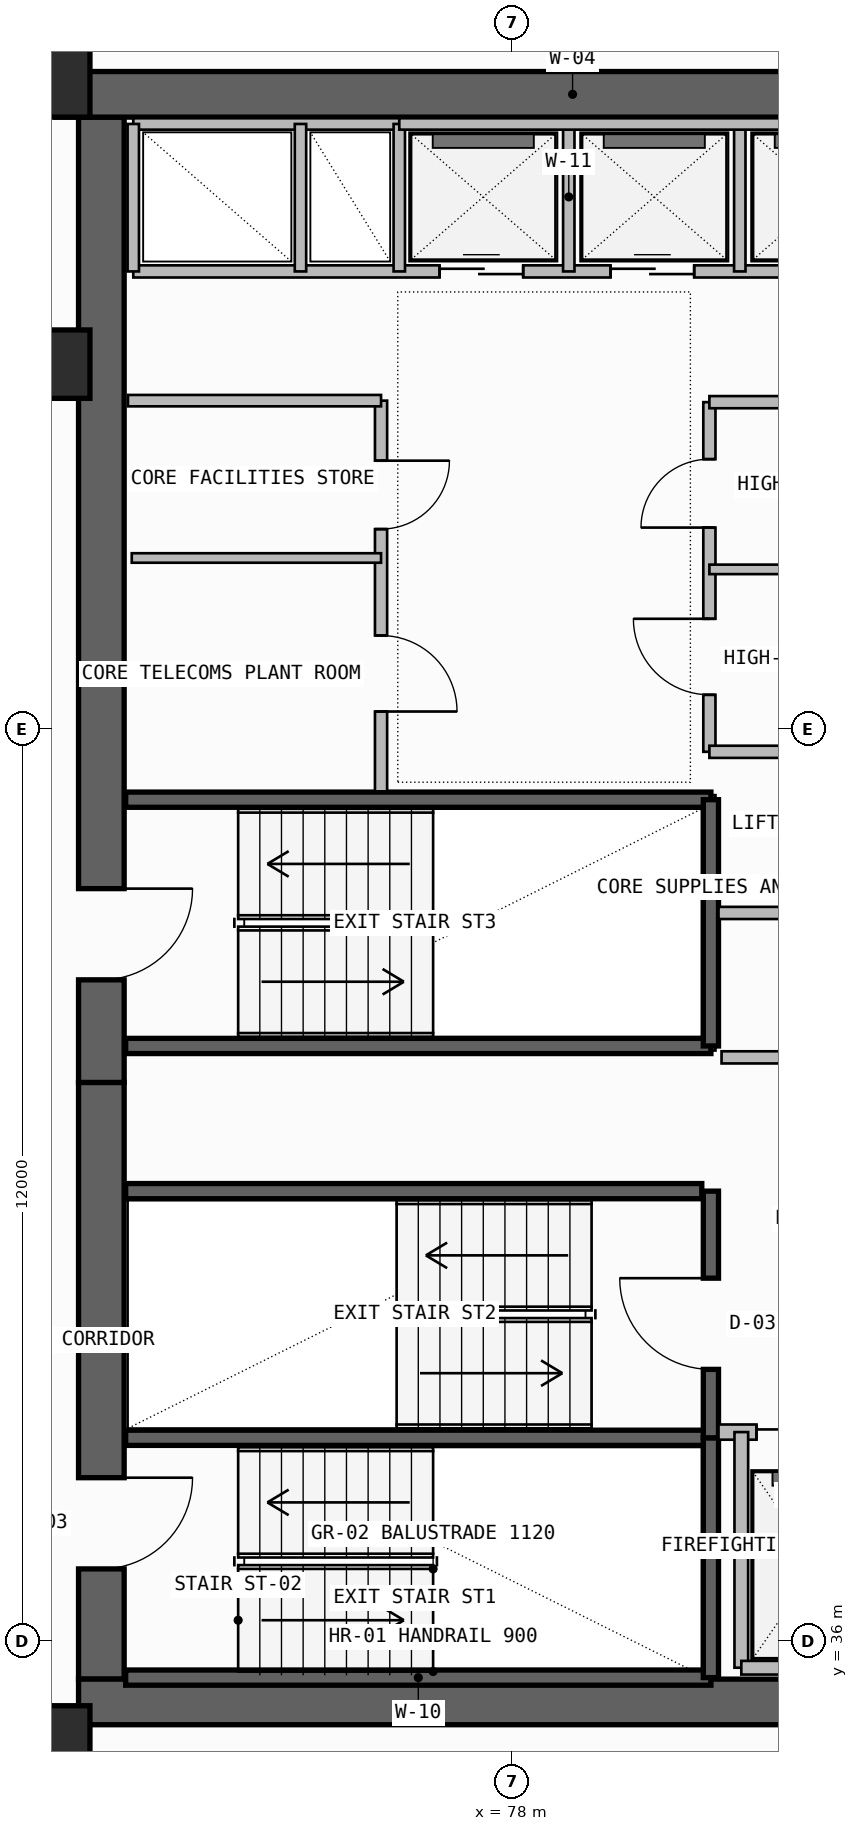
"""IFC4 building model, lengths in metres.
Left out: names, types, materials, properties, quantities, classifications, styles, units other than length and angle.
Written with IfcOpenShell. Run it as: python <this file> out.ifc"""

import sys

from ifc_helpers import new_model, si_unit, direction, frame, frame_2d, origin, origin_2d, place, context, subcontext, project, spatial, rectangle, extrude, element, fill, save


model = new_model("IFC4")
c1 = context("Model", 3, precision=1e-05, world=origin(), true_north=direction((0.0, 1.0)))
c2 = subcontext(c1, "Body", "Model", "MODEL_VIEW")
j1 = project(units=[si_unit("LENGTHUNIT", "METRE"), si_unit("PLANEANGLEUNIT", "RADIAN")], contexts=[c1])
p1 = place(None, origin())
s1 = spatial("IfcSite", under=j1, at=p1, CompositionType="ELEMENT")
p2 = place(p1, origin())
s2 = spatial("IfcBuilding", under=s1, at=p2, CompositionType="ELEMENT")
p3 = place(p2, frame((0.0, 0.0, 243.14)))
s3 = spatial("IfcBuildingStorey", under=s2, at=p3, CompositionType="ELEMENT", Elevation=243.14)
p4 = place(p3, frame((72.6, 35.5, -0.26), z_axis=(0.0, 0.0, 1.0), x_axis=(0.0, 1.0, 0.0)))
e1 = element("IfcWall", 1, at=p4, inside=s3, PredefinedType="SHEAR", context=c2, shape_type="SweptSolid", body=[
    extrude(rectangle(XDim=7.85, YDim=0.6, at=frame_2d((3.925, 0.0))), origin(), (0.0, 0.0, 1.0), 3.52),
])
p5 = place(p4, frame((1.45, 0.0, 0.26)))
e2 = element("IfcOpeningElement", 2, at=p5, cuts=e1, PredefinedType="OPENING", context=c2, shape_type="SweptSolid", body=[
    extrude(rectangle(XDim=1.2, YDim=2.2, at=frame_2d((0.6, 1.1))), frame((0.0, 0.31, 0.0), z_axis=(0.0, -1.0, 0.0), x_axis=(1.0, 0.0, 0.0)), (0.0, 0.0, 1.0), 0.62),
])
p6 = place(p3, frame((72.3, 35.2, -0.26), z_axis=(0.0, 0.0, 1.0), x_axis=(1.0, 0.0, 0.0)))
e3 = element("IfcWall", 3, at=p6, inside=s3, PredefinedType="SHEAR", context=c2, shape_type="SweptSolid", body=[
    extrude(rectangle(XDim=13.3, YDim=0.6, at=frame_2d((6.65, 0.0))), origin(), (0.0, 0.0, 1.0), 3.52),
])
p7 = place(p3, frame((72.6, 43.35, -0.26), z_axis=(0.0, 0.0, 1.0), x_axis=(0.0, 1.0, 0.0)))
e4 = element("IfcWall", 4, at=p7, inside=s3, PredefinedType="SHEAR", context=c2, shape_type="SweptSolid", body=[
    extrude(rectangle(XDim=12.7, YDim=0.6, at=frame_2d((6.35, 0.0))), origin(), (0.0, 0.0, 1.0), 3.52),
])
p8 = place(p7, frame((1.35, 0.0, 0.26)))
e5 = element("IfcOpeningElement", 5, at=p8, cuts=e4, PredefinedType="OPENING", context=c2, shape_type="SweptSolid", body=[
    extrude(rectangle(XDim=1.2, YDim=2.2, at=frame_2d((0.6, 1.1))), frame((0.0, 0.31, 0.0), z_axis=(0.0, -1.0, 0.0), x_axis=(1.0, 0.0, 0.0)), (0.0, 0.0, 1.0), 0.62),
])
p9 = place(p3, frame((72.0, 56.35, -0.26), z_axis=(0.0, 0.0, 1.0), x_axis=(1.0, 0.0, 0.0)))
e6 = element("IfcWall", 6, at=p9, inside=s3, PredefinedType="SHEAR", context=c2, shape_type="SweptSolid", body=[
    extrude(rectangle(XDim=13.6, YDim=0.6, at=frame_2d((6.8, 0.0))), origin(), (0.0, 0.0, 1.0), 3.52),
])
for number, where, z_axis, x_axis in (
    (7, (72.0, 34.7, 0.0), (0.0, 0.0, 1.0), (1.0, 0.0, 0.0)),
    (8, (72.0, 52.8, 0.0), (0.0, 0.0, 1.0), (1.0, 0.0, 0.0)),
    (9, (72.0, 56.5, 0.0), (0.0, 0.0, 1.0), (1.0, 0.0, 0.0)),
):
    element("IfcColumn", number, at=place(p3, frame(where, z_axis=z_axis, x_axis=x_axis)), inside=s3, PredefinedType="COLUMN", context=c2, shape_type="SweptSolid", body=[
        extrude(rectangle(XDim=0.9, YDim=0.9, at=origin_2d()), origin(), (0.0, 0.0, 1.0), 3.52),
    ])
for number, where, z_axis, x_axis in (
    (10, (72.92, 35.52, -0.26), (0.0, 0.0, 1.0), (1.0, 0.0, 0.0)),
    (11, (72.92, 38.675, -0.26), (0.0, 0.0, 1.0), (1.0, 0.0, 0.0)),
):
    element("IfcWall", number, at=place(p3, frame(where, z_axis=z_axis, x_axis=x_axis)), inside=s3, PredefinedType="SOLIDWALL", context=c2, shape_type="SweptSolid", body=[
        extrude(rectangle(XDim=7.7, YDim=0.2, at=frame_2d((3.85, 0.0))), origin(), (0.0, 0.0, 1.0), 3.52),
    ])
p10 = place(p3, frame((80.62, 35.52, -0.26), z_axis=(0.0, 0.0, 1.0), x_axis=(0.0, 1.0, 0.0)))
e12 = element("IfcWall", 12, at=p10, inside=s3, PredefinedType="SOLIDWALL", context=c2, shape_type="SweptSolid", body=[
    extrude(rectangle(XDim=3.155, YDim=0.2, at=frame_2d((1.578, 0.0))), origin(), (0.0, 0.0, 1.0), 3.52),
])
p11 = place(p3, frame((80.62, 38.675, -0.26), z_axis=(0.0, 0.0, 1.0), x_axis=(0.0, 1.0, 0.0)))
e13 = element("IfcWall", 13, at=p11, inside=s3, PredefinedType="SOLIDWALL", context=c2, shape_type="SweptSolid", body=[
    extrude(rectangle(XDim=3.245, YDim=0.2, at=frame_2d((1.623, 0.0))), origin(), (0.0, 0.0, 1.0), 3.52),
])
p12 = place(p11, frame((0.9, 0.0, 0.26)))
e14 = element("IfcOpeningElement", 14, at=p12, cuts=e13, PredefinedType="OPENING", context=c2, shape_type="SweptSolid", body=[
    extrude(rectangle(XDim=1.2, YDim=2.2, at=frame_2d((0.6, 1.1))), frame((0.0, 0.11, 0.0), z_axis=(0.0, -1.0, 0.0), x_axis=(1.0, 0.0, 0.0)), (0.0, 0.0, 1.0), 0.22),
])
p13 = place(p3, frame((80.72, 38.75, 0.0), z_axis=(0.0, 0.0, 1.0), x_axis=(1.0, 0.0, 0.0)))
e15 = element("IfcWall", 15, at=p13, inside=s3, PredefinedType="SOLIDWALL", context=c2, shape_type="SweptSolid", body=[
    extrude(rectangle(XDim=4.26, YDim=0.2, at=frame_2d((2.13, 0.0))), origin(), (0.0, 0.0, 1.0), 3.26),
])
p14 = place(p13, frame((0.5, 0.0, 0.0)))
e16 = element("IfcOpeningElement", 16, at=p14, cuts=e15, PredefinedType="OPENING", context=c2, shape_type="SweptSolid", body=[
    extrude(rectangle(XDim=1.3, YDim=2.3, at=frame_2d((0.65, 1.15))), frame((0.0, 0.11, 0.0), z_axis=(0.0, -1.0, 0.0), x_axis=(1.0, 0.0, 0.0)), (0.0, 0.0, 1.0), 0.22),
])
p15 = place(p13, frame((2.45, 0.0, 0.0)))
e17 = element("IfcOpeningElement", 17, at=p15, cuts=e15, PredefinedType="OPENING", context=c2, shape_type="SweptSolid", body=[
    extrude(rectangle(XDim=1.3, YDim=2.3, at=frame_2d((0.65, 1.15))), frame((0.0, 0.11, 0.0), z_axis=(0.0, -1.0, 0.0), x_axis=(1.0, 0.0, 0.0)), (0.0, 0.0, 1.0), 0.22),
])
p16 = place(p3, frame((81.02, 35.65, 0.0), z_axis=(0.0, 0.0, 1.0), x_axis=(0.0, 1.0, 0.0)))
e18 = element("IfcWall", 18, at=p16, inside=s3, PredefinedType="SOLIDWALL", context=c2, shape_type="SweptSolid", body=[
    extrude(rectangle(XDim=3.1, YDim=0.18, at=frame_2d((1.55, 0.0))), origin(), (0.0, 0.0, 1.0), 3.26),
])
p17 = place(p3, frame((81.02, 35.65, 0.0), z_axis=(0.0, 0.0, 1.0), x_axis=(1.0, 0.0, 0.0)))
e19 = element("IfcWall", 19, at=p17, inside=s3, PredefinedType="SOLIDWALL", context=c2, shape_type="SweptSolid", body=[
    extrude(rectangle(XDim=3.93, YDim=0.18, at=frame_2d((1.965, 0.0))), origin(), (0.0, 0.0, 1.0), 3.26),
])
p18 = place(p3, frame((72.92, 41.92, -0.26), z_axis=(0.0, 0.0, 1.0), x_axis=(1.0, 0.0, 0.0)))
e20 = element("IfcWall", 20, at=p18, inside=s3, PredefinedType="SOLIDWALL", context=c2, shape_type="SweptSolid", body=[
    extrude(rectangle(XDim=7.58, YDim=0.2, at=frame_2d((3.79, 0.0))), origin(), (0.0, 0.0, 1.0), 3.52),
])
for number, where, z_axis, x_axis in (
    (21, (72.92, 43.83, -0.26), (0.0, 0.0, 1.0), (1.0, 0.0, 0.0)),
    (22, (72.92, 47.07, -0.26), (0.0, 0.0, 1.0), (1.0, 0.0, 0.0)),
):
    element("IfcWall", number, at=place(p3, frame(where, z_axis=z_axis, x_axis=x_axis)), inside=s3, PredefinedType="SOLIDWALL", context=c2, shape_type="SweptSolid", body=[
        extrude(rectangle(XDim=7.7, YDim=0.2, at=frame_2d((3.85, 0.0))), origin(), (0.0, 0.0, 1.0), 3.52),
    ])
p19 = place(p3, frame((80.62, 43.83, -0.26), z_axis=(0.0, 0.0, 1.0), x_axis=(0.0, 1.0, 0.0)))
e23 = element("IfcWall", 23, at=p19, inside=s3, PredefinedType="SOLIDWALL", context=c2, shape_type="SweptSolid", body=[
    extrude(rectangle(XDim=3.24, YDim=0.2, at=frame_2d((1.62, 0.0))), origin(), (0.0, 0.0, 1.0), 3.52),
])
p20 = place(p3, frame((80.72, 45.58, 0.0), z_axis=(0.0, 0.0, 1.0), x_axis=(1.0, 0.0, 0.0)))
e24 = element("IfcWall", 24, at=p20, inside=s3, PredefinedType="PLUMBINGWALL", context=c2, shape_type="SweptSolid", body=[
    extrude(rectangle(XDim=4.23, YDim=0.16, at=frame_2d((2.115, 0.0))), origin(), (0.0, 0.0, 1.0), 3.26),
])
p21 = place(p20, frame((1.65, 0.0, 0.0)))
e25 = element("IfcOpeningElement", 25, at=p21, cuts=e24, PredefinedType="OPENING", context=c2, shape_type="SweptSolid", body=[
    extrude(rectangle(XDim=0.9, YDim=2.1, at=frame_2d((0.45, 1.05))), frame((0.0, 0.09, 0.0), z_axis=(0.0, -1.0, 0.0), x_axis=(1.0, 0.0, 0.0)), (0.0, 0.0, 1.0), 0.18),
])
p22 = place(p3, frame((80.76, 43.68, 0.0), z_axis=(0.0, 0.0, 1.0), x_axis=(1.0, 0.0, 0.0)))
e26 = element("IfcWall", 26, at=p22, inside=s3, PredefinedType="PLUMBINGWALL", context=c2, shape_type="SweptSolid", body=[
    extrude(rectangle(XDim=4.19, YDim=0.16, at=frame_2d((2.095, 0.0))), origin(), (0.0, 0.0, 1.0), 3.26),
])
p23 = place(p3, frame((76.28, 47.18, 0.0), z_axis=(0.0, 0.0, 1.0), x_axis=(0.0, 1.0, 0.0)))
e27 = element("IfcWall", 27, at=p23, inside=s3, PredefinedType="SOLIDWALL", context=c2, shape_type="SweptSolid", body=[
    extrude(rectangle(XDim=5.14, YDim=0.16, at=frame_2d((2.57, 0.0))), origin(), (0.0, 0.0, 1.0), 3.26),
])
p24 = place(p23, frame((1.05, 0.0, 0.0)))
e28 = element("IfcOpeningElement", 28, at=p24, cuts=e27, PredefinedType="OPENING", context=c2, shape_type="SweptSolid", body=[
    extrude(rectangle(XDim=1.0, YDim=2.2, at=frame_2d((0.5, 1.1))), frame((0.0, 0.09, 0.0), z_axis=(0.0, -1.0, 0.0), x_axis=(1.0, 0.0, 0.0)), (0.0, 0.0, 1.0), 0.18),
])
p25 = place(p23, frame((3.45, 0.0, 0.0)))
e29 = element("IfcOpeningElement", 29, at=p25, cuts=e27, PredefinedType="OPENING", context=c2, shape_type="SweptSolid", body=[
    extrude(rectangle(XDim=0.9, YDim=2.1, at=frame_2d((0.45, 1.05))), frame((0.0, 0.09, 0.0), z_axis=(0.0, -1.0, 0.0), x_axis=(1.0, 0.0, 0.0)), (0.0, 0.0, 1.0), 0.18),
])
p26 = place(p3, frame((72.95, 52.32, 0.0), z_axis=(0.0, 0.0, 1.0), x_axis=(1.0, 0.0, 0.0)))
e30 = element("IfcWall", 30, at=p26, inside=s3, PredefinedType="SOLIDWALL", context=c2, shape_type="SweptSolid", body=[
    extrude(rectangle(XDim=3.33, YDim=0.15, at=frame_2d((1.665, 0.0))), origin(), (0.0, 0.0, 1.0), 3.26),
])
p27 = place(p3, frame((73.0, 50.25, 0.0), z_axis=(0.0, 0.0, 1.0), x_axis=(1.0, 0.0, 0.0)))
e31 = element("IfcWall", 31, at=p27, inside=s3, PredefinedType="PARTITIONING", context=c2, shape_type="SweptSolid", body=[
    extrude(rectangle(XDim=3.28, YDim=0.125, at=frame_2d((1.64, 0.0))), origin(), (0.0, 0.0, 1.0), 3.26),
])
p28 = place(p3, frame((80.6, 47.7, 0.0), z_axis=(0.0, 0.0, 1.0), x_axis=(0.0, 1.0, 0.0)))
e32 = element("IfcWall", 32, at=p28, inside=s3, PredefinedType="SOLIDWALL", context=c2, shape_type="SweptSolid", body=[
    extrude(rectangle(XDim=4.6, YDim=0.16, at=frame_2d((2.3, 0.0))), origin(), (0.0, 0.0, 1.0), 3.26),
])
p29 = place(p28, frame((0.75, 0.0, 0.0)))
e33 = element("IfcOpeningElement", 33, at=p29, cuts=e32, PredefinedType="OPENING", context=c2, shape_type="SweptSolid", body=[
    extrude(rectangle(XDim=1.0, YDim=2.2, at=frame_2d((0.5, 1.1))), frame((0.0, 0.09, 0.0), z_axis=(0.0, -1.0, 0.0), x_axis=(1.0, 0.0, 0.0)), (0.0, 0.0, 1.0), 0.18),
])
p30 = place(p28, frame((2.95, 0.0, 0.0)))
e34 = element("IfcOpeningElement", 34, at=p30, cuts=e32, PredefinedType="OPENING", context=c2, shape_type="SweptSolid", body=[
    extrude(rectangle(XDim=0.9, YDim=2.1, at=frame_2d((0.45, 1.05))), frame((0.0, 0.09, 0.0), z_axis=(0.0, -1.0, 0.0), x_axis=(1.0, 0.0, 0.0)), (0.0, 0.0, 1.0), 0.18),
])
p31 = place(p3, frame((80.6, 47.7, 0.0), z_axis=(0.0, 0.0, 1.0), x_axis=(1.0, 0.0, 0.0)))
e35 = element("IfcWall", 35, at=p31, inside=s3, PredefinedType="SOLIDWALL", context=c2, shape_type="SweptSolid", body=[
    extrude(rectangle(XDim=4.4, YDim=0.16, at=frame_2d((2.2, 0.0))), origin(), (0.0, 0.0, 1.0), 3.26),
])
p32 = place(p3, frame((80.6, 52.3, 0.0), z_axis=(0.0, 0.0, 1.0), x_axis=(1.0, 0.0, 0.0)))
e36 = element("IfcWall", 36, at=p32, inside=s3, PredefinedType="SOLIDWALL", context=c2, shape_type="SweptSolid", body=[
    extrude(rectangle(XDim=4.22, YDim=0.16, at=frame_2d((2.11, 0.0))), origin(), (0.0, 0.0, 1.0), 3.26),
])
p33 = place(p3, frame((80.6, 50.1, 0.0), z_axis=(0.0, 0.0, 1.0), x_axis=(1.0, 0.0, 0.0)))
e37 = element("IfcWall", 37, at=p33, inside=s3, PredefinedType="PARTITIONING", context=c2, shape_type="SweptSolid", body=[
    extrude(rectangle(XDim=4.22, YDim=0.125, at=frame_2d((2.11, 0.0))), origin(), (0.0, 0.0, 1.0), 3.26),
])
p34 = place(p3, frame((73.02, 54.02, 0.0), z_axis=(0.0, 0.0, 1.0), x_axis=(1.0, 0.0, 0.0)))
e38 = element("IfcWall", 38, at=p34, inside=s3, PredefinedType="SOLIDWALL", context=c2, shape_type="SweptSolid", body=[
    extrude(rectangle(XDim=12.08, YDim=0.16, at=frame_2d((6.04, 0.0))), origin(), (0.0, 0.0, 1.0), 3.26),
])
p35 = place(p34, frame((4.03, 0.0, 0.0)))
e39 = element("IfcOpeningElement", 39, at=p35, cuts=e38, PredefinedType="OPENING", context=c2, shape_type="SweptSolid", body=[
    extrude(rectangle(XDim=1.1, YDim=2.25, at=frame_2d((0.55, 1.125))), frame((0.0, 0.09, 0.0), z_axis=(0.0, -1.0, 0.0), x_axis=(1.0, 0.0, 0.0)), (0.0, 0.0, 1.0), 0.18),
])
p36 = place(p34, frame((6.28, 0.0, 0.0)))
e40 = element("IfcOpeningElement", 40, at=p36, cuts=e38, PredefinedType="OPENING", context=c2, shape_type="SweptSolid", body=[
    extrude(rectangle(XDim=1.1, YDim=2.25, at=frame_2d((0.55, 1.125))), frame((0.0, 0.09, 0.0), z_axis=(0.0, -1.0, 0.0), x_axis=(1.0, 0.0, 0.0)), (0.0, 0.0, 1.0), 0.18),
])
p37 = place(p34, frame((8.53, 0.0, 0.0)))
e41 = element("IfcOpeningElement", 41, at=p37, cuts=e38, PredefinedType="OPENING", context=c2, shape_type="SweptSolid", body=[
    extrude(rectangle(XDim=1.1, YDim=2.25, at=frame_2d((0.55, 1.125))), frame((0.0, 0.09, 0.0), z_axis=(0.0, -1.0, 0.0), x_axis=(1.0, 0.0, 0.0)), (0.0, 0.0, 1.0), 0.18),
])
p38 = place(p3, frame((73.02, 55.96, 0.0), z_axis=(0.0, 0.0, 1.0), x_axis=(1.0, 0.0, 0.0)))
e42 = element("IfcWall", 42, at=p38, inside=s3, PredefinedType="SOLIDWALL", context=c2, shape_type="SweptSolid", body=[
    extrude(rectangle(XDim=3.5, YDim=0.15, at=frame_2d((1.75, 0.0))), origin(), (0.0, 0.0, 1.0), 3.26),
])
p39 = place(p3, frame((73.02, 54.02, 0.0), z_axis=(0.0, 0.0, 1.0), x_axis=(0.0, 1.0, 0.0)))
e43 = element("IfcWall", 43, at=p39, inside=s3, PredefinedType="PLUMBINGWALL", context=c2, shape_type="SweptSolid", body=[
    extrude(rectangle(XDim=1.94, YDim=0.15, at=frame_2d((0.97, 0.0))), origin(), (0.0, 0.0, 1.0), 3.26),
])
p40 = place(p3, frame((76.52, 54.02, 0.0), z_axis=(0.0, 0.0, 1.0), x_axis=(0.0, 1.0, 0.0)))
e44 = element("IfcWall", 44, at=p40, inside=s3, PredefinedType="SOLIDWALL", context=c2, shape_type="SweptSolid", body=[
    extrude(rectangle(XDim=1.94, YDim=0.15, at=frame_2d((0.97, 0.0))), origin(), (0.0, 0.0, 1.0), 3.26),
])
p41 = place(p3, frame((75.22, 54.02, 0.0), z_axis=(0.0, 0.0, 1.0), x_axis=(0.0, 1.0, 0.0)))
e45 = element("IfcWall", 45, at=p41, inside=s3, PredefinedType="PLUMBINGWALL", context=c2, shape_type="SweptSolid", body=[
    extrude(rectangle(XDim=1.94, YDim=0.15, at=frame_2d((0.97, 0.0))), origin(), (0.0, 0.0, 1.0), 3.26),
])
for number, where, z_axis, x_axis in (
    (46, (78.75, 54.02, 0.0), (0.0, 0.0, 1.0), (0.0, 1.0, 0.0)),
    (47, (81.0, 54.02, 0.0), (0.0, 0.0, 1.0), (0.0, 1.0, 0.0)),
):
    element("IfcWall", number, at=place(p3, frame(where, z_axis=z_axis, x_axis=x_axis)), inside=s3, PredefinedType="PLUMBINGWALL", context=c2, shape_type="SweptSolid", body=[
        extrude(rectangle(XDim=1.96, YDim=0.15, at=frame_2d((0.98, 0.0))), origin(), (0.0, 0.0, 1.0), 3.26),
    ])
p42 = place(p3, frame((76.52, 55.96, 0.0), z_axis=(0.0, 0.0, 1.0), x_axis=(1.0, 0.0, 0.0)))
e48 = element("IfcWall", 48, at=p42, inside=s3, PredefinedType="SOLIDWALL", context=c2, shape_type="SweptSolid", body=[
    extrude(rectangle(XDim=6.7, YDim=0.15, at=frame_2d((3.35, 0.0))), origin(), (0.0, 0.0, 1.0), 3.26),
])
p43 = place(p5, frame((1.2, 0.0, 0.0), z_axis=(0.0, 0.0, 1.0), x_axis=(-1.0, 0.0, 0.0)))
e49 = element("IfcDoor", 49, at=p43, inside=s3, OperationType="SINGLE_SWING_LEFT", PredefinedType="USERDEFINED", context=c2, shape_type="SweptSolid", body=[
    extrude(rectangle(XDim=1.2, YDim=2.2, at=frame_2d((0.6, 1.1))), frame((0.0, 0.025, 0.0), z_axis=(0.0, -1.0, 0.0), x_axis=(1.0, 0.0, 0.0)), (0.0, 0.0, 1.0), 0.05),
])
fill(e2, e49)
p44 = place(p12, origin())
e50 = element("IfcDoor", 50, at=p44, inside=s3, OperationType="SINGLE_SWING_RIGHT", PredefinedType="USERDEFINED", context=c2, shape_type="SweptSolid", body=[
    extrude(rectangle(XDim=1.2, YDim=2.2, at=frame_2d((0.6, 1.1))), frame((0.0, 0.025, 0.0), z_axis=(0.0, -1.0, 0.0), x_axis=(1.0, 0.0, 0.0)), (0.0, 0.0, 1.0), 0.05),
])
fill(e14, e50)
p45 = place(p14, origin())
e51 = element("IfcDoor", 51, at=p45, inside=s3, OperationType="DOUBLE_DOOR_SLIDING", PredefinedType="DOOR", context=c2, shape_type="SweptSolid", body=[
    extrude(rectangle(XDim=1.3, YDim=2.3, at=frame_2d((0.65, 1.15))), frame((0.0, 0.025, 0.0), z_axis=(0.0, -1.0, 0.0), x_axis=(1.0, 0.0, 0.0)), (0.0, 0.0, 1.0), 0.05),
])
fill(e16, e51)
p46 = place(p8, frame((1.2, 0.0, 0.0), z_axis=(0.0, 0.0, 1.0), x_axis=(-1.0, 0.0, 0.0)))
e52 = element("IfcDoor", 52, at=p46, inside=s3, OperationType="SINGLE_SWING_LEFT", PredefinedType="USERDEFINED", context=c2, shape_type="SweptSolid", body=[
    extrude(rectangle(XDim=1.2, YDim=2.2, at=frame_2d((0.6, 1.1))), frame((0.0, 0.025, 0.0), z_axis=(0.0, -1.0, 0.0), x_axis=(1.0, 0.0, 0.0)), (0.0, 0.0, 1.0), 0.05),
])
fill(e5, e52)
p47 = place(p24, frame((1.0, 0.0, 0.0), z_axis=(0.0, 0.0, 1.0), x_axis=(-1.0, 0.0, 0.0)))
e53 = element("IfcDoor", 53, at=p47, inside=s3, OperationType="SINGLE_SWING_RIGHT", PredefinedType="DOOR", context=c2, shape_type="SweptSolid", body=[
    extrude(rectangle(XDim=1.0, YDim=2.2, at=frame_2d((0.5, 1.1))), frame((0.0, 0.025, 0.0), z_axis=(0.0, -1.0, 0.0), x_axis=(1.0, 0.0, 0.0)), (0.0, 0.0, 1.0), 0.05),
])
fill(e28, e53)
p48 = place(p25, frame((0.9, 0.0, 0.0), z_axis=(0.0, 0.0, 1.0), x_axis=(-1.0, 0.0, 0.0)))
e54 = element("IfcDoor", 54, at=p48, inside=s3, OperationType="SINGLE_SWING_LEFT", PredefinedType="DOOR", context=c2, shape_type="SweptSolid", body=[
    extrude(rectangle(XDim=0.9, YDim=2.1, at=frame_2d((0.45, 1.05))), frame((0.0, 0.025, 0.0), z_axis=(0.0, -1.0, 0.0), x_axis=(1.0, 0.0, 0.0)), (0.0, 0.0, 1.0), 0.05),
])
fill(e29, e54)
p49 = place(p29, origin())
e55 = element("IfcDoor", 55, at=p49, inside=s3, OperationType="SINGLE_SWING_RIGHT", PredefinedType="DOOR", context=c2, shape_type="SweptSolid", body=[
    extrude(rectangle(XDim=1.0, YDim=2.2, at=frame_2d((0.5, 1.1))), frame((0.0, 0.025, 0.0), z_axis=(0.0, -1.0, 0.0), x_axis=(1.0, 0.0, 0.0)), (0.0, 0.0, 1.0), 0.05),
])
fill(e33, e55)
p50 = place(p30, origin())
e56 = element("IfcDoor", 56, at=p50, inside=s3, OperationType="SINGLE_SWING_LEFT", PredefinedType="DOOR", context=c2, shape_type="SweptSolid", body=[
    extrude(rectangle(XDim=0.9, YDim=2.1, at=frame_2d((0.45, 1.05))), frame((0.0, 0.025, 0.0), z_axis=(0.0, -1.0, 0.0), x_axis=(1.0, 0.0, 0.0)), (0.0, 0.0, 1.0), 0.05),
])
fill(e34, e56)
p51 = place(p35, origin())
e57 = element("IfcDoor", 57, at=p51, inside=s3, OperationType="DOUBLE_DOOR_SLIDING", PredefinedType="DOOR", context=c2, shape_type="SweptSolid", body=[
    extrude(rectangle(XDim=1.1, YDim=2.25, at=frame_2d((0.55, 1.125))), frame((0.0, 0.025, 0.0), z_axis=(0.0, -1.0, 0.0), x_axis=(1.0, 0.0, 0.0)), (0.0, 0.0, 1.0), 0.05),
])
fill(e39, e57)
p52 = place(p36, origin())
e58 = element("IfcDoor", 58, at=p52, inside=s3, OperationType="DOUBLE_DOOR_SLIDING", PredefinedType="DOOR", context=c2, shape_type="SweptSolid", body=[
    extrude(rectangle(XDim=1.1, YDim=2.25, at=frame_2d((0.55, 1.125))), frame((0.0, 0.025, 0.0), z_axis=(0.0, -1.0, 0.0), x_axis=(1.0, 0.0, 0.0)), (0.0, 0.0, 1.0), 0.05),
])
fill(e40, e58)
save(model, sys.argv[1])
